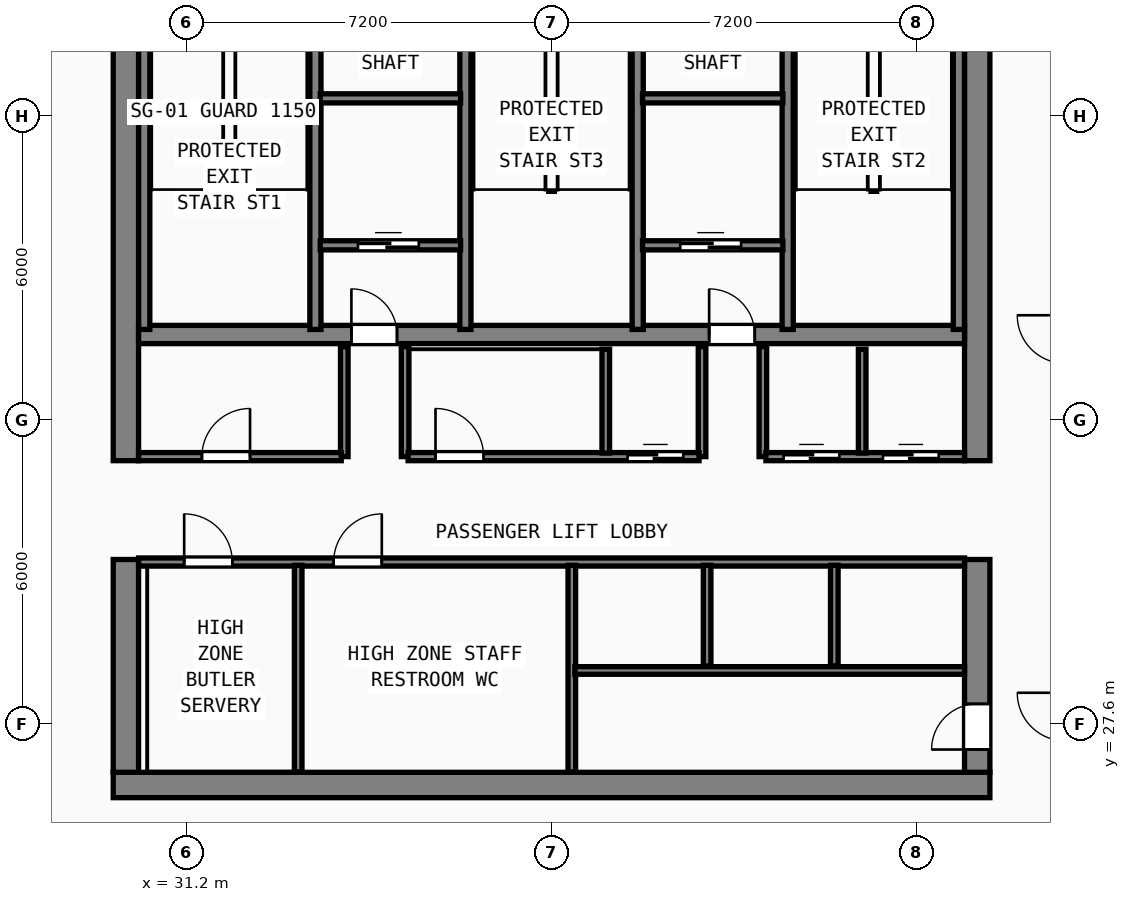
"""IFC4 building model, lengths in metres.
Left out: names, types, materials, properties, quantities, classifications, styles, units other than length and angle.
Written with IfcOpenShell. Run it as: python <this file> out.ifc"""

import sys

from ifc_helpers import new_model, si_unit, direction, frame, frame_2d, origin, place, context, subcontext, project, spatial, rectangle, extrude, element, fill, save


model = new_model("IFC4")
c1 = context("Model", 3, precision=1e-05, world=origin(), true_north=direction((0.0, 1.0)))
c2 = subcontext(c1, "Body", "Model", "MODEL_VIEW")
j1 = project(units=[si_unit("LENGTHUNIT", "METRE"), si_unit("PLANEANGLEUNIT", "RADIAN")], contexts=[c1])
p1 = place(None, origin())
s1 = spatial("IfcSite", under=j1, at=p1, CompositionType="ELEMENT")
p2 = place(p1, origin())
s2 = spatial("IfcBuilding", under=s1, at=p2, CompositionType="ELEMENT")
p3 = place(p2, frame((0.0, 0.0, 282.2)))
s3 = spatial("IfcBuildingStorey", under=s2, at=p3, CompositionType="ELEMENT", Elevation=282.2)
p4 = place(p3, frame((29.75, 26.4, 0.0), z_axis=(0.0, 0.0, 1.0), x_axis=(1.0, 0.0, 0.0)))
e1 = element("IfcWall", 1, at=p4, inside=s3, PredefinedType="SHEAR", context=c2, shape_type="SweptSolid", body=[
    extrude(rectangle(XDim=17.3, YDim=0.5, at=frame_2d((8.65, 0.0))), origin(), (0.0, 0.0, 1.0), 3.72),
])
p5 = place(p3, frame((30.0, 26.65, 0.0), z_axis=(0.0, 0.0, 1.0), x_axis=(0.0, 1.0, 0.0)))
e2 = element("IfcWall", 2, at=p5, inside=s3, PredefinedType="SHEAR", context=c2, shape_type="SweptSolid", body=[
    extrude(rectangle(XDim=4.2, YDim=0.5, at=frame_2d((2.1, 0.0))), origin(), (0.0, 0.0, 1.0), 3.72),
])
p6 = place(p3, frame((30.0, 32.8, 0.0), z_axis=(0.0, 0.0, 1.0), x_axis=(0.0, 1.0, 0.0)))
e3 = element("IfcWall", 3, at=p6, inside=s3, PredefinedType="SHEAR", context=c2, shape_type="SweptSolid", body=[
    extrude(rectangle(XDim=10.15, YDim=0.5, at=frame_2d((5.075, 0.0))), origin(), (0.0, 0.0, 1.0), 3.72),
])
p7 = place(p3, frame((46.8, 26.65, 0.0), z_axis=(0.0, 0.0, 1.0), x_axis=(0.0, 1.0, 0.0)))
e4 = element("IfcWall", 4, at=p7, inside=s3, PredefinedType="SHEAR", context=c2, shape_type="SweptSolid", body=[
    extrude(rectangle(XDim=4.2, YDim=0.5, at=frame_2d((2.1, 0.0))), origin(), (0.0, 0.0, 1.0), 3.72),
])
p8 = place(p7, frame((1.35, 0.0, 0.0), z_axis=(0.0, 0.0, 1.0), x_axis=(-1.0, 0.0, 0.0)))
e5 = element("IfcOpeningElement", 5, at=p8, cuts=e4, PredefinedType="OPENING", context=c2, shape_type="SweptSolid", body=[
    extrude(rectangle(XDim=0.9, YDim=2.1, at=frame_2d((0.45, 1.05))), frame((0.0, 0.26, 0.0), z_axis=(0.0, -1.0, 0.0), x_axis=(1.0, 0.0, 0.0)), (0.0, 0.0, 1.0), 0.52),
])
p9 = place(p3, frame((46.8, 32.8, 0.0), z_axis=(0.0, 0.0, 1.0), x_axis=(0.0, 1.0, 0.0)))
e6 = element("IfcWall", 6, at=p9, inside=s3, PredefinedType="SHEAR", context=c2, shape_type="SweptSolid", body=[
    extrude(rectangle(XDim=10.15, YDim=0.5, at=frame_2d((5.075, 0.0))), origin(), (0.0, 0.0, 1.0), 3.72),
])
p10 = place(p3, frame((30.25, 35.29, 0.0), z_axis=(0.0, 0.0, 1.0), x_axis=(1.0, 0.0, 0.0)))
e7 = element("IfcWall", 7, at=p10, inside=s3, PredefinedType="SHEAR", context=c2, shape_type="SweptSolid", body=[
    extrude(rectangle(XDim=16.3, YDim=0.36, at=frame_2d((8.15, 0.0))), origin(), (0.0, 0.0, 1.0), 3.72),
])
p11 = place(p10, frame((5.1, 0.0, 0.0), z_axis=(0.0, 0.0, 1.0), x_axis=(-1.0, 0.0, 0.0)))
e8 = element("IfcOpeningElement", 8, at=p11, cuts=e7, PredefinedType="OPENING", context=c2, shape_type="SweptSolid", body=[
    extrude(rectangle(XDim=0.9, YDim=2.1, at=frame_2d((0.45, 1.05))), frame((0.0, 0.19, 0.0), z_axis=(0.0, -1.0, 0.0), x_axis=(1.0, 0.0, 0.0)), (0.0, 0.0, 1.0), 0.38),
])
p12 = place(p10, frame((12.16, 0.0, 0.0), z_axis=(0.0, 0.0, 1.0), x_axis=(-1.0, 0.0, 0.0)))
e9 = element("IfcOpeningElement", 9, at=p12, cuts=e7, PredefinedType="OPENING", context=c2, shape_type="SweptSolid", body=[
    extrude(rectangle(XDim=0.9, YDim=2.1, at=frame_2d((0.45, 1.05))), frame((0.0, 0.19, 0.0), z_axis=(0.0, -1.0, 0.0), x_axis=(1.0, 0.0, 0.0)), (0.0, 0.0, 1.0), 0.38),
])
for number, where, z_axis, x_axis in (
    (10, (30.362, 35.39, 0.0), (0.0, 0.0, 1.0), (0.0, 1.0, 0.0)),
    (11, (33.74, 35.39, 0.0), (0.0, 0.0, 1.0), (0.0, 1.0, 0.0)),
    (12, (36.7, 35.39, 0.0), (0.0, 0.0, 1.0), (0.0, 1.0, 0.0)),
    (13, (40.1, 35.39, 0.0), (0.0, 0.0, 1.0), (0.0, 1.0, 0.0)),
    (14, (43.06, 35.39, 0.0), (0.0, 0.0, 1.0), (0.0, 1.0, 0.0)),
    (15, (46.438, 35.39, 0.0), (0.0, 0.0, 1.0), (0.0, 1.0, 0.0)),
):
    element("IfcWall", number, at=place(p3, frame(where, z_axis=z_axis, x_axis=x_axis)), inside=s3, PredefinedType="SHEAR", context=c2, shape_type="SweptSolid", body=[
        extrude(rectangle(XDim=7.56, YDim=0.22, at=frame_2d((3.78, 0.0))), origin(), (0.0, 0.0, 1.0), 3.72),
    ])
for number, where, z_axis, x_axis in (
    (16, (33.835, 39.95, 0.0), (0.0, 0.0, 1.0), (1.0, 0.0, 0.0)),
    (17, (40.195, 39.95, 0.0), (0.0, 0.0, 1.0), (1.0, 0.0, 0.0)),
):
    element("IfcWall", number, at=place(p3, frame(where, z_axis=z_axis, x_axis=x_axis)), inside=s3, PredefinedType="SOLIDWALL", context=c2, shape_type="SweptSolid", body=[
        extrude(rectangle(XDim=2.77, YDim=0.18, at=frame_2d((1.385, 0.0))), origin(), (0.0, 0.0, 1.0), 3.72),
    ])
p13 = place(p3, frame((33.835, 37.05, 0.0), z_axis=(0.0, 0.0, 1.0), x_axis=(1.0, 0.0, 0.0)))
e18 = element("IfcWall", 18, at=p13, inside=s3, PredefinedType="SOLIDWALL", context=c2, shape_type="SweptSolid", body=[
    extrude(rectangle(XDim=2.77, YDim=0.18, at=frame_2d((1.385, 0.0))), origin(), (0.0, 0.0, 1.0), 3.72),
])
p14 = place(p13, frame((1.945, 0.0, 0.0), z_axis=(0.0, 0.0, 1.0), x_axis=(-1.0, 0.0, 0.0)))
e19 = element("IfcOpeningElement", 19, at=p14, cuts=e18, PredefinedType="OPENING", context=c2, shape_type="SweptSolid", body=[
    extrude(rectangle(XDim=1.2, YDim=2.2, at=frame_2d((0.6, 1.1))), frame((0.0, 0.1, 0.0), z_axis=(0.0, -1.0, 0.0), x_axis=(1.0, 0.0, 0.0)), (0.0, 0.0, 1.0), 0.2),
])
for number, where, z_axis, x_axis in (
    (20, (34.31, 32.88, 0.0), (0.0, 0.0, 1.0), (0.0, 1.0, 0.0)),
    (21, (35.51, 32.88, 0.0), (0.0, 0.0, 1.0), (0.0, 1.0, 0.0)),
):
    element("IfcWall", number, at=place(p3, frame(where, z_axis=z_axis, x_axis=x_axis)), inside=s3, PredefinedType="SOLIDWALL", context=c2, shape_type="SweptSolid", body=[
        extrude(rectangle(XDim=2.17, YDim=0.15, at=frame_2d((1.085, 0.0))), origin(), (0.0, 0.0, 1.0), 3.72),
    ])
p15 = place(p3, frame((40.195, 37.05, 0.0), z_axis=(0.0, 0.0, 1.0), x_axis=(1.0, 0.0, 0.0)))
e22 = element("IfcWall", 22, at=p15, inside=s3, PredefinedType="SOLIDWALL", context=c2, shape_type="SweptSolid", body=[
    extrude(rectangle(XDim=2.77, YDim=0.18, at=frame_2d((1.385, 0.0))), origin(), (0.0, 0.0, 1.0), 3.72),
])
p16 = place(p15, frame((1.945, 0.0, 0.0), z_axis=(0.0, 0.0, 1.0), x_axis=(-1.0, 0.0, 0.0)))
e23 = element("IfcOpeningElement", 23, at=p16, cuts=e22, PredefinedType="OPENING", context=c2, shape_type="SweptSolid", body=[
    extrude(rectangle(XDim=1.2, YDim=2.2, at=frame_2d((0.6, 1.1))), frame((0.0, 0.1, 0.0), z_axis=(0.0, -1.0, 0.0), x_axis=(1.0, 0.0, 0.0)), (0.0, 0.0, 1.0), 0.2),
])
for number, where, z_axis, x_axis in (
    (24, (41.37, 32.88, 0.0), (0.0, 0.0, 1.0), (0.0, 1.0, 0.0)),
    (25, (42.57, 32.88, 0.0), (0.0, 0.0, 1.0), (0.0, 1.0, 0.0)),
):
    element("IfcWall", number, at=place(p3, frame(where, z_axis=z_axis, x_axis=x_axis)), inside=s3, PredefinedType="SOLIDWALL", context=c2, shape_type="SweptSolid", body=[
        extrude(rectangle(XDim=2.17, YDim=0.15, at=frame_2d((1.085, 0.0))), origin(), (0.0, 0.0, 1.0), 3.72),
    ])
p17 = place(p3, frame((30.25, 32.88, 0.0), z_axis=(0.0, 0.0, 1.0), x_axis=(1.0, 0.0, 0.0)))
e26 = element("IfcWall", 26, at=p17, inside=s3, PredefinedType="SOLIDWALL", context=c2, shape_type="SweptSolid", body=[
    extrude(rectangle(XDim=4.0, YDim=0.16, at=frame_2d((2.0, 0.0))), origin(), (0.0, 0.0, 1.0), 3.72),
])
p18 = place(p17, frame((2.2, 0.0, 0.0), z_axis=(0.0, 0.0, 1.0), x_axis=(-1.0, 0.0, 0.0)))
e27 = element("IfcOpeningElement", 27, at=p18, cuts=e26, PredefinedType="OPENING", context=c2, shape_type="SweptSolid", body=[
    extrude(rectangle(XDim=0.95, YDim=2.12, at=frame_2d((0.475, 1.06))), frame((0.0, 0.09, 0.0), z_axis=(0.0, -1.0, 0.0), x_axis=(1.0, 0.0, 0.0)), (0.0, 0.0, 1.0), 0.18),
])
p19 = place(p3, frame((35.57, 32.88, 0.0), z_axis=(0.0, 0.0, 1.0), x_axis=(1.0, 0.0, 0.0)))
e28 = element("IfcWall", 28, at=p19, inside=s3, PredefinedType="SOLIDWALL", context=c2, shape_type="SweptSolid", body=[
    extrude(rectangle(XDim=5.74, YDim=0.16, at=frame_2d((2.87, 0.0))), origin(), (0.0, 0.0, 1.0), 3.72),
])
p20 = place(p19, frame((1.49, 0.0, 0.0), z_axis=(0.0, 0.0, 1.0), x_axis=(-1.0, 0.0, 0.0)))
e29 = element("IfcOpeningElement", 29, at=p20, cuts=e28, PredefinedType="OPENING", context=c2, shape_type="SweptSolid", body=[
    extrude(rectangle(XDim=0.95, YDim=2.12, at=frame_2d((0.475, 1.06))), frame((0.0, 0.09, 0.0), z_axis=(0.0, -1.0, 0.0), x_axis=(1.0, 0.0, 0.0)), (0.0, 0.0, 1.0), 0.18),
])
p21 = place(p19, frame((5.43, 0.0, 0.0), z_axis=(0.0, 0.0, 1.0), x_axis=(-1.0, 0.0, 0.0)))
e30 = element("IfcOpeningElement", 30, at=p21, cuts=e28, PredefinedType="OPENING", context=c2, shape_type="SweptSolid", body=[
    extrude(rectangle(XDim=1.1, YDim=2.2, at=frame_2d((0.55, 1.1))), frame((0.0, 0.09, 0.0), z_axis=(0.0, -1.0, 0.0), x_axis=(1.0, 0.0, 0.0)), (0.0, 0.0, 1.0), 0.18),
])
p22 = place(p3, frame((42.63, 32.88, 0.0), z_axis=(0.0, 0.0, 1.0), x_axis=(1.0, 0.0, 0.0)))
e31 = element("IfcWall", 31, at=p22, inside=s3, PredefinedType="SOLIDWALL", context=c2, shape_type="SweptSolid", body=[
    extrude(rectangle(XDim=3.92, YDim=0.16, at=frame_2d((1.96, 0.0))), origin(), (0.0, 0.0, 1.0), 3.72),
])
p23 = place(p22, frame((1.45, 0.0, 0.0), z_axis=(0.0, 0.0, 1.0), x_axis=(-1.0, 0.0, 0.0)))
e32 = element("IfcOpeningElement", 32, at=p23, cuts=e31, PredefinedType="OPENING", context=c2, shape_type="SweptSolid", body=[
    extrude(rectangle(XDim=1.1, YDim=2.2, at=frame_2d((0.55, 1.1))), frame((0.0, 0.09, 0.0), z_axis=(0.0, -1.0, 0.0), x_axis=(1.0, 0.0, 0.0)), (0.0, 0.0, 1.0), 0.18),
])
p24 = place(p22, frame((3.41, 0.0, 0.0), z_axis=(0.0, 0.0, 1.0), x_axis=(-1.0, 0.0, 0.0)))
e33 = element("IfcOpeningElement", 33, at=p24, cuts=e31, PredefinedType="OPENING", context=c2, shape_type="SweptSolid", body=[
    extrude(rectangle(XDim=1.1, YDim=2.2, at=frame_2d((0.55, 1.1))), frame((0.0, 0.09, 0.0), z_axis=(0.0, -1.0, 0.0), x_axis=(1.0, 0.0, 0.0)), (0.0, 0.0, 1.0), 0.18),
])
for number, where, z_axis, x_axis in (
    (34, (39.47, 32.95, 0.0), (0.0, 0.0, 1.0), (0.0, 1.0, 0.0)),
    (35, (44.53, 32.95, 0.0), (0.0, 0.0, 1.0), (0.0, 1.0, 0.0)),
):
    element("IfcWall", number, at=place(p3, frame(where, z_axis=z_axis, x_axis=x_axis)), inside=s3, PredefinedType="SOLIDWALL", context=c2, shape_type="SweptSolid", body=[
        extrude(rectangle(XDim=2.05, YDim=0.15, at=frame_2d((1.025, 0.0))), origin(), (0.0, 0.0, 1.0), 3.72),
    ])
p25 = place(p3, frame((30.25, 30.8, 0.0), z_axis=(0.0, 0.0, 1.0), x_axis=(1.0, 0.0, 0.0)))
e36 = element("IfcWall", 36, at=p25, inside=s3, PredefinedType="SOLIDWALL", context=c2, shape_type="SweptSolid", body=[
    extrude(rectangle(XDim=16.3, YDim=0.16, at=frame_2d((8.15, 0.0))), origin(), (0.0, 0.0, 1.0), 3.72),
])
p26 = place(p25, frame((0.9, 0.0, 0.0)))
e37 = element("IfcOpeningElement", 37, at=p26, cuts=e36, PredefinedType="OPENING", context=c2, shape_type="SweptSolid", body=[
    extrude(rectangle(XDim=0.95, YDim=2.12, at=frame_2d((0.475, 1.06))), frame((0.0, 0.09, 0.0), z_axis=(0.0, -1.0, 0.0), x_axis=(1.0, 0.0, 0.0)), (0.0, 0.0, 1.0), 0.18),
])
p27 = place(p25, frame((3.85, 0.0, 0.0)))
e38 = element("IfcOpeningElement", 38, at=p27, cuts=e36, PredefinedType="OPENING", context=c2, shape_type="SweptSolid", body=[
    extrude(rectangle(XDim=0.95, YDim=2.12, at=frame_2d((0.475, 1.06))), frame((0.0, 0.09, 0.0), z_axis=(0.0, -1.0, 0.0), x_axis=(1.0, 0.0, 0.0)), (0.0, 0.0, 1.0), 0.18),
])
p28 = place(p3, frame((38.8, 26.66, 0.0), z_axis=(0.0, 0.0, 1.0), x_axis=(0.0, 1.0, 0.0)))
e39 = element("IfcWall", 39, at=p28, inside=s3, PredefinedType="SOLIDWALL", context=c2, shape_type="SweptSolid", body=[
    extrude(rectangle(XDim=4.075, YDim=0.15, at=frame_2d((2.038, 0.0))), origin(), (0.0, 0.0, 1.0), 3.72),
])
p29 = place(p3, frame((33.4, 26.66, 0.0), z_axis=(0.0, 0.0, 1.0), x_axis=(0.0, 1.0, 0.0)))
e40 = element("IfcWall", 40, at=p29, inside=s3, PredefinedType="PARTITIONING", context=c2, shape_type="SweptSolid", body=[
    extrude(rectangle(XDim=4.075, YDim=0.15, at=frame_2d((2.038, 0.0))), origin(), (0.0, 0.0, 1.0), 3.72),
])
p30 = place(p3, frame((38.86, 28.66, 0.0), z_axis=(0.0, 0.0, 1.0), x_axis=(1.0, 0.0, 0.0)))
e41 = element("IfcWall", 41, at=p30, inside=s3, PredefinedType="PARTITIONING", context=c2, shape_type="SweptSolid", body=[
    extrude(rectangle(XDim=7.69, YDim=0.15, at=frame_2d((3.845, 0.0))), origin(), (0.0, 0.0, 1.0), 3.72),
])
for number, where, z_axis, x_axis in (
    (42, (41.47, 28.75, 0.0), (0.0, 0.0, 1.0), (0.0, 1.0, 0.0)),
    (43, (43.98, 28.75, 0.0), (0.0, 0.0, 1.0), (0.0, 1.0, 0.0)),
):
    element("IfcWall", number, at=place(p3, frame(where, z_axis=z_axis, x_axis=x_axis)), inside=s3, PredefinedType="SOLIDWALL", context=c2, shape_type="SweptSolid", body=[
        extrude(rectangle(XDim=1.985, YDim=0.15, at=frame_2d((0.993, 0.0))), origin(), (0.0, 0.0, 1.0), 3.72),
    ])
p31 = place(p14, origin())
e44 = element("IfcDoor", 44, at=p31, inside=s3, OperationType="SLIDING_TO_RIGHT", PredefinedType="DOOR", context=c2, shape_type="SweptSolid", body=[
    extrude(rectangle(XDim=1.2, YDim=2.2, at=frame_2d((0.6, 1.1))), frame((0.0, 0.025, 0.0), z_axis=(0.0, -1.0, 0.0), x_axis=(1.0, 0.0, 0.0)), (0.0, 0.0, 1.0), 0.05),
])
fill(e19, e44)
p32 = place(p11, origin())
e45 = element("IfcDoor", 45, at=p32, inside=s3, OperationType="SINGLE_SWING_RIGHT", PredefinedType="DOOR", context=c2, shape_type="SweptSolid", body=[
    extrude(rectangle(XDim=0.9, YDim=2.1, at=frame_2d((0.45, 1.05))), frame((0.0, 0.025, 0.0), z_axis=(0.0, -1.0, 0.0), x_axis=(1.0, 0.0, 0.0)), (0.0, 0.0, 1.0), 0.05),
])
fill(e8, e45)
p33 = place(p16, origin())
e46 = element("IfcDoor", 46, at=p33, inside=s3, OperationType="SLIDING_TO_RIGHT", PredefinedType="DOOR", context=c2, shape_type="SweptSolid", body=[
    extrude(rectangle(XDim=1.2, YDim=2.2, at=frame_2d((0.6, 1.1))), frame((0.0, 0.025, 0.0), z_axis=(0.0, -1.0, 0.0), x_axis=(1.0, 0.0, 0.0)), (0.0, 0.0, 1.0), 0.05),
])
fill(e23, e46)
p34 = place(p12, origin())
e47 = element("IfcDoor", 47, at=p34, inside=s3, OperationType="SINGLE_SWING_RIGHT", PredefinedType="DOOR", context=c2, shape_type="SweptSolid", body=[
    extrude(rectangle(XDim=0.9, YDim=2.1, at=frame_2d((0.45, 1.05))), frame((0.0, 0.025, 0.0), z_axis=(0.0, -1.0, 0.0), x_axis=(1.0, 0.0, 0.0)), (0.0, 0.0, 1.0), 0.05),
])
fill(e9, e47)
p35 = place(p18, origin())
e48 = element("IfcDoor", 48, at=p35, inside=s3, OperationType="SINGLE_SWING_LEFT", PredefinedType="DOOR", context=c2, shape_type="SweptSolid", body=[
    extrude(rectangle(XDim=0.95, YDim=2.12, at=frame_2d((0.475, 1.06))), frame((0.0, 0.025, 0.0), z_axis=(0.0, -1.0, 0.0), x_axis=(1.0, 0.0, 0.0)), (0.0, 0.0, 1.0), 0.05),
])
fill(e27, e48)
p36 = place(p20, origin())
e49 = element("IfcDoor", 49, at=p36, inside=s3, OperationType="SINGLE_SWING_RIGHT", PredefinedType="DOOR", context=c2, shape_type="SweptSolid", body=[
    extrude(rectangle(XDim=0.95, YDim=2.12, at=frame_2d((0.475, 1.06))), frame((0.0, 0.025, 0.0), z_axis=(0.0, -1.0, 0.0), x_axis=(1.0, 0.0, 0.0)), (0.0, 0.0, 1.0), 0.05),
])
fill(e29, e49)
p37 = place(p21, origin())
e50 = element("IfcDoor", 50, at=p37, inside=s3, OperationType="SLIDING_TO_RIGHT", PredefinedType="DOOR", context=c2, shape_type="SweptSolid", body=[
    extrude(rectangle(XDim=1.1, YDim=2.2, at=frame_2d((0.55, 1.1))), frame((0.0, 0.025, 0.0), z_axis=(0.0, -1.0, 0.0), x_axis=(1.0, 0.0, 0.0)), (0.0, 0.0, 1.0), 0.05),
])
fill(e30, e50)
p38 = place(p23, origin())
e51 = element("IfcDoor", 51, at=p38, inside=s3, OperationType="SLIDING_TO_RIGHT", PredefinedType="DOOR", context=c2, shape_type="SweptSolid", body=[
    extrude(rectangle(XDim=1.1, YDim=2.2, at=frame_2d((0.55, 1.1))), frame((0.0, 0.025, 0.0), z_axis=(0.0, -1.0, 0.0), x_axis=(1.0, 0.0, 0.0)), (0.0, 0.0, 1.0), 0.05),
])
fill(e32, e51)
p39 = place(p24, origin())
e52 = element("IfcDoor", 52, at=p39, inside=s3, OperationType="SLIDING_TO_RIGHT", PredefinedType="DOOR", context=c2, shape_type="SweptSolid", body=[
    extrude(rectangle(XDim=1.1, YDim=2.2, at=frame_2d((0.55, 1.1))), frame((0.0, 0.025, 0.0), z_axis=(0.0, -1.0, 0.0), x_axis=(1.0, 0.0, 0.0)), (0.0, 0.0, 1.0), 0.05),
])
fill(e33, e52)
p40 = place(p26, origin())
e53 = element("IfcDoor", 53, at=p40, inside=s3, OperationType="SINGLE_SWING_LEFT", PredefinedType="DOOR", context=c2, shape_type="SweptSolid", body=[
    extrude(rectangle(XDim=0.95, YDim=2.12, at=frame_2d((0.475, 1.06))), frame((0.0, 0.025, 0.0), z_axis=(0.0, -1.0, 0.0), x_axis=(1.0, 0.0, 0.0)), (0.0, 0.0, 1.0), 0.05),
])
fill(e37, e53)
p41 = place(p27, origin())
e54 = element("IfcDoor", 54, at=p41, inside=s3, OperationType="SINGLE_SWING_RIGHT", PredefinedType="DOOR", context=c2, shape_type="SweptSolid", body=[
    extrude(rectangle(XDim=0.95, YDim=2.12, at=frame_2d((0.475, 1.06))), frame((0.0, 0.025, 0.0), z_axis=(0.0, -1.0, 0.0), x_axis=(1.0, 0.0, 0.0)), (0.0, 0.0, 1.0), 0.05),
])
fill(e38, e54)
p42 = place(p8, origin())
e55 = element("IfcDoor", 55, at=p42, inside=s3, OperationType="SINGLE_SWING_RIGHT", PredefinedType="DOOR", context=c2, shape_type="SweptSolid", body=[
    extrude(rectangle(XDim=0.9, YDim=2.1, at=frame_2d((0.45, 1.05))), frame((0.0, -0.135, 0.0), z_axis=(0.0, -1.0, 0.0), x_axis=(1.0, 0.0, 0.0)), (0.0, 0.0, 1.0), 0.05),
])
fill(e5, e55)
save(model, sys.argv[1])
